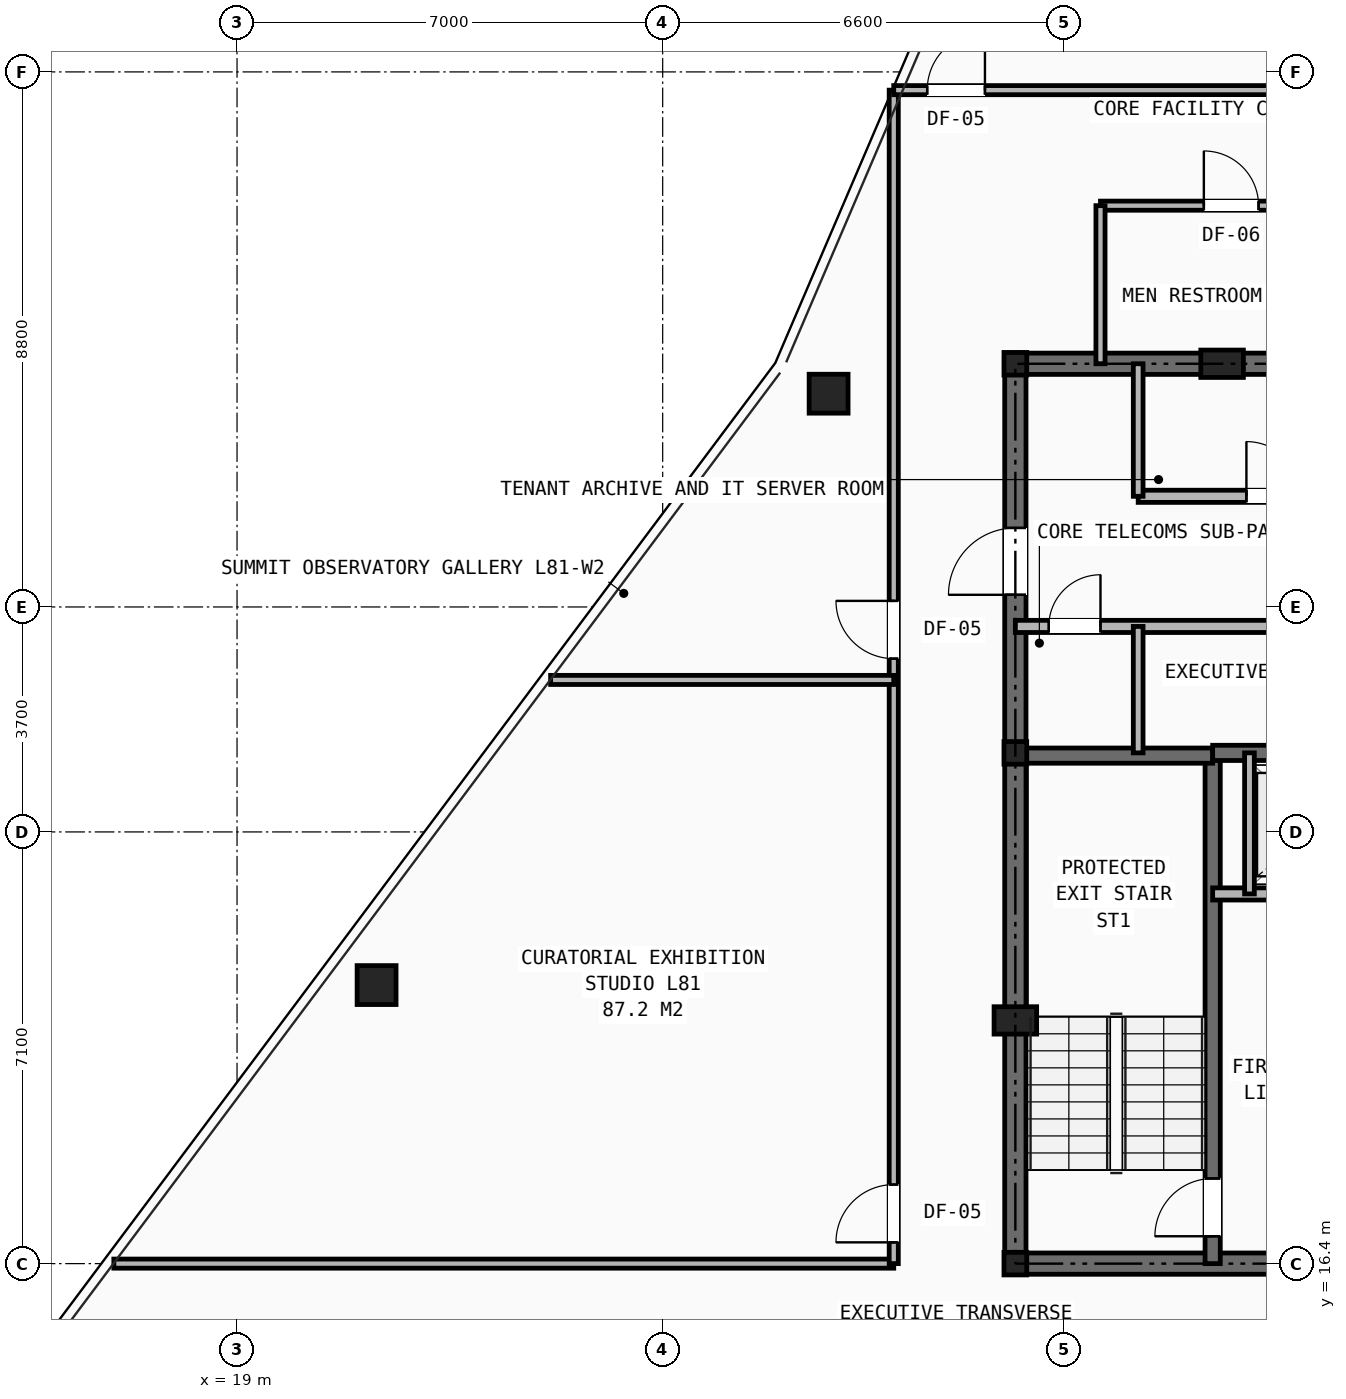
"""IFC4 building model, lengths in metres.
Left out: names, types, materials, properties, quantities, classifications, styles, units other than length and angle.
Written with IfcOpenShell. Run it as: python <this file> out.ifc"""

import sys

from ifc_helpers import new_model, si_unit, direction, frame, frame_2d, origin, origin_2d, place, context, subcontext, project, spatial, rectangle, hollow_rectangle, i_section, extrude, element, fill, save


model = new_model("IFC4")
c1 = context("Model", 3, precision=1e-05, world=origin(), true_north=direction((0.0, 1.0)))
c2 = subcontext(c1, "Body", "Model", "MODEL_VIEW")
j1 = project(units=[si_unit("LENGTHUNIT", "METRE"), si_unit("PLANEANGLEUNIT", "RADIAN")], contexts=[c1])
p1 = place(None, origin())
s1 = spatial("IfcSite", under=j1, at=p1, CompositionType="ELEMENT")
p2 = place(p1, origin())
s2 = spatial("IfcBuilding", under=s1, at=p2, CompositionType="ELEMENT")
p3 = place(p2, frame((0.0, 0.0, 286.5)))
s3 = spatial("IfcBuildingStorey", under=s2, at=p3, CompositionType="ELEMENT", Elevation=286.5)
for number, where, z_axis, x_axis in (
    (1, (31.8, 16.4, 0.0), (0.0, 0.0, 1.0), (1.0, 0.0, 0.0)),
    (2, (31.8, 24.8, 0.0), (0.0, 0.0, 1.0), (1.0, 0.0, 0.0)),
    (3, (31.8, 31.2, 0.0), (0.0, 0.0, 1.0), (1.0, 0.0, 0.0)),
):
    element("IfcColumn", number, at=place(p3, frame(where, z_axis=z_axis, x_axis=x_axis)), inside=s3, PredefinedType="COLUMN", context=c2, shape_type="SweptSolid", body=[
        extrude(i_section(OverallWidth=0.374, OverallDepth=0.372, WebThickness=0.016, FlangeThickness=0.026, at=origin_2d()), origin(), (0.0, 0.0, 1.0), 3.5),
    ])
for number, where, z_axis, x_axis in (
    (4, (31.8, 20.4, 0.0), (0.0, 0.0, 1.0), (1.0, 0.0, 0.0)),
    (5, (35.2, 31.2, 0.0), (0.0, 0.0, 1.0), (1.0, 0.0, 0.0)),
):
    element("IfcColumn", number, at=place(p3, frame(where, z_axis=z_axis, x_axis=x_axis)), inside=s3, PredefinedType="PILASTER", context=c2, shape_type="SweptSolid", body=[
        extrude(rectangle(XDim=0.7, YDim=0.45, at=origin_2d()), origin(), (0.0, 0.0, 1.0), 3.5),
    ])
for number, where, z_axis, x_axis in (
    (6, (28.729, 30.708, 0.0), (0.0, 0.0, 1.0), (1.0, 0.0, 0.0)),
    (7, (21.295, 20.981, 0.0), (0.0, 0.0, 1.0), (1.0, 0.0, 0.0)),
):
    element("IfcColumn", number, at=place(p3, frame(where, z_axis=z_axis, x_axis=x_axis)), inside=s3, PredefinedType="COLUMN", context=c2, shape_type="SweptSolid", body=[
        extrude(hollow_rectangle(XDim=0.64, YDim=0.64, WallThickness=0.045, at=origin_2d()), origin(), (0.0, 0.0, 1.0), 3.5),
    ])
p4 = place(p3, frame((31.8, 16.4, 0.0), z_axis=(0.0, 0.0, 1.0), x_axis=(1.0, 0.0, 0.0)))
e8 = element("IfcWall", 8, at=p4, inside=s3, PredefinedType="SHEAR", context=c2, shape_type="SweptSolid", body=[
    extrude(rectangle(XDim=16.4, YDim=0.35, at=frame_2d((8.2, 0.0))), origin(), (0.0, 0.0, 1.0), 3.2),
])
p5 = place(p4, frame((7.75, 0.0, 0.0)))
e9 = element("IfcOpeningElement", 9, at=p5, cuts=e8, PredefinedType="OPENING", context=c2, shape_type="SweptSolid", body=[
    extrude(rectangle(XDim=0.9, YDim=2.1, at=frame_2d((0.45, 1.05))), frame((0.0, 0.185, 0.0), z_axis=(0.0, -1.0, 0.0), x_axis=(1.0, 0.0, 0.0)), (0.0, 0.0, 1.0), 0.37),
])
p6 = place(p4, frame((4.2, 0.0, 0.0)))
e10 = element("IfcOpeningElement", 10, at=p6, cuts=e8, PredefinedType="OPENING", context=c2, shape_type="SweptSolid", body=[
    extrude(rectangle(XDim=0.95, YDim=2.1, at=frame_2d((0.475, 1.05))), frame((0.0, 0.185, 0.0), z_axis=(0.0, -1.0, 0.0), x_axis=(1.0, 0.0, 0.0)), (0.0, 0.0, 1.0), 0.37),
])
p7 = place(p4, frame((10.6, 0.0, 0.0)))
e11 = element("IfcOpeningElement", 11, at=p7, cuts=e8, PredefinedType="OPENING", context=c2, shape_type="SweptSolid", body=[
    extrude(rectangle(XDim=0.95, YDim=2.1, at=frame_2d((0.475, 1.05))), frame((0.0, 0.185, 0.0), z_axis=(0.0, -1.0, 0.0), x_axis=(1.0, 0.0, 0.0)), (0.0, 0.0, 1.0), 0.37),
])
p8 = place(p3, frame((31.8, 31.2, 0.0), z_axis=(0.0, 0.0, 1.0), x_axis=(1.0, 0.0, 0.0)))
e12 = element("IfcWall", 12, at=p8, inside=s3, PredefinedType="SHEAR", context=c2, shape_type="SweptSolid", body=[
    extrude(rectangle(XDim=16.4, YDim=0.35, at=frame_2d((8.2, 0.0))), origin(), (0.0, 0.0, 1.0), 3.2),
])
p9 = place(p3, frame((31.8, 16.4, 0.0), z_axis=(0.0, 0.0, 1.0), x_axis=(0.0, 1.0, 0.0)))
e13 = element("IfcWall", 13, at=p9, inside=s3, PredefinedType="SHEAR", context=c2, shape_type="SweptSolid", body=[
    extrude(rectangle(XDim=14.8, YDim=0.35, at=frame_2d((7.4, 0.0))), origin(), (0.0, 0.0, 1.0), 3.2),
])
p10 = place(p9, frame((11.0, 0.0, 0.0)))
e14 = element("IfcOpeningElement", 14, at=p10, cuts=e13, PredefinedType="OPENING", context=c2, shape_type="SweptSolid", body=[
    extrude(rectangle(XDim=1.1, YDim=2.15, at=frame_2d((0.55, 1.075))), frame((0.0, 0.185, 0.0), z_axis=(0.0, -1.0, 0.0), x_axis=(1.0, 0.0, 0.0)), (0.0, 0.0, 1.0), 0.37),
])
p11 = place(p3, frame((35.045, 16.4, 0.0), z_axis=(0.0, 0.0, 1.0), x_axis=(0.0, 1.0, 0.0)))
e15 = element("IfcWall", 15, at=p11, inside=s3, PredefinedType="SHEAR", context=c2, shape_type="SweptSolid", body=[
    extrude(rectangle(XDim=8.4, YDim=0.25, at=frame_2d((4.2, 0.0))), origin(), (0.0, 0.0, 1.0), 3.2),
])
p12 = place(p11, frame((0.45, 0.0, 0.0)))
e16 = element("IfcOpeningElement", 16, at=p12, cuts=e15, PredefinedType="OPENING", context=c2, shape_type="SweptSolid", body=[
    extrude(rectangle(XDim=0.95, YDim=2.1, at=frame_2d((0.475, 1.05))), frame((0.0, 0.135, 0.0), z_axis=(0.0, -1.0, 0.0), x_axis=(1.0, 0.0, 0.0)), (0.0, 0.0, 1.0), 0.27),
])
p13 = place(p3, frame((31.8, 24.755, 0.0), z_axis=(0.0, 0.0, 1.0), x_axis=(1.0, 0.0, 0.0)))
e17 = element("IfcWall", 17, at=p13, inside=s3, PredefinedType="SHEAR", context=c2, shape_type="SweptSolid", body=[
    extrude(rectangle(XDim=3.245, YDim=0.25, at=frame_2d((1.623, 0.0))), origin(), (0.0, 0.0, 1.0), 3.2),
])
p14 = place(p3, frame((35.045, 24.8, 0.0), z_axis=(0.0, 0.0, 1.0), x_axis=(1.0, 0.0, 0.0)))
e18 = element("IfcWall", 18, at=p14, inside=s3, PredefinedType="SHEAR", context=c2, shape_type="SweptSolid", body=[
    extrude(rectangle(XDim=9.91, YDim=0.25, at=frame_2d((4.955, 0.0))), origin(), (0.0, 0.0, 1.0), 3.2),
])
p15 = place(p3, frame((35.045, 22.48, 0.0), z_axis=(0.0, 0.0, 1.0), x_axis=(1.0, 0.0, 0.0)))
e19 = element("IfcWall", 19, at=p15, inside=s3, PredefinedType="SOLIDWALL", context=c2, shape_type="SweptSolid", body=[
    extrude(rectangle(XDim=9.91, YDim=0.2, at=frame_2d((4.955, 0.0))), origin(), (0.0, 0.0, 1.0), 3.2),
])
p16 = place(p15, frame((1.255, 0.0, 0.0)))
e20 = element("IfcOpeningElement", 20, at=p16, cuts=e19, PredefinedType="OPENING", context=c2, shape_type="SweptSolid", body=[
    extrude(rectangle(XDim=1.1, YDim=2.15, at=frame_2d((0.55, 1.075))), frame((0.0, 0.11, 0.0), z_axis=(0.0, -1.0, 0.0), x_axis=(1.0, 0.0, 0.0)), (0.0, 0.0, 1.0), 0.22),
])
p17 = place(p15, frame((7.555, 0.0, 0.0)))
e21 = element("IfcOpeningElement", 21, at=p17, cuts=e19, PredefinedType="OPENING", context=c2, shape_type="SweptSolid", body=[
    extrude(rectangle(XDim=1.1, YDim=2.15, at=frame_2d((0.55, 1.075))), frame((0.0, 0.11, 0.0), z_axis=(0.0, -1.0, 0.0), x_axis=(1.0, 0.0, 0.0)), (0.0, 0.0, 1.0), 0.22),
])
p18 = place(p15, frame((4.405, 0.0, 0.0)))
e22 = element("IfcOpeningElement", 22, at=p18, cuts=e19, PredefinedType="OPENING", context=c2, shape_type="SweptSolid", body=[
    extrude(rectangle(XDim=1.1, YDim=2.15, at=frame_2d((0.55, 1.075))), frame((0.0, 0.11, 0.0), z_axis=(0.0, -1.0, 0.0), x_axis=(1.0, 0.0, 0.0)), (0.0, 0.0, 1.0), 0.22),
])
p19 = place(p3, frame((35.65, 22.48, 0.0), z_axis=(0.0, 0.0, 1.0), x_axis=(0.0, 1.0, 0.0)))
e23 = element("IfcWall", 23, at=p19, inside=s3, PredefinedType="SOLIDWALL", context=c2, shape_type="SweptSolid", body=[
    extrude(rectangle(XDim=2.32, YDim=0.16, at=frame_2d((1.16, 0.0))), origin(), (0.0, 0.0, 1.0), 3.2),
])
p20 = place(p3, frame((33.82, 29.02, 0.0), z_axis=(0.0, 0.0, 1.0), x_axis=(1.0, 0.0, 0.0)))
e24 = element("IfcWall", 24, at=p20, inside=s3, PredefinedType="SOLIDWALL", context=c2, shape_type="SweptSolid", body=[
    extrude(rectangle(XDim=14.38, YDim=0.2, at=frame_2d((7.19, 0.0))), origin(), (0.0, 0.0, 1.0), 2.655),
])
p21 = place(p20, frame((1.78, 0.0, 0.0)))
e25 = element("IfcOpeningElement", 25, at=p21, cuts=e24, PredefinedType="OPENING", context=c2, shape_type="SweptSolid", body=[
    extrude(rectangle(XDim=0.9, YDim=2.1, at=frame_2d((0.45, 1.05))), frame((0.0, 0.11, 0.0), z_axis=(0.0, -1.0, 0.0), x_axis=(1.0, 0.0, 0.0)), (0.0, 0.0, 1.0), 0.22),
])
p22 = place(p20, frame((6.07, 0.0, 0.0)))
e26 = element("IfcOpeningElement", 26, at=p22, cuts=e24, PredefinedType="OPENING", context=c2, shape_type="SweptSolid", body=[
    extrude(rectangle(XDim=0.9, YDim=2.1, at=frame_2d((0.45, 1.05))), frame((0.0, 0.11, 0.0), z_axis=(0.0, -1.0, 0.0), x_axis=(1.0, 0.0, 0.0)), (0.0, 0.0, 1.0), 0.22),
])
p23 = place(p20, frame((9.39, 0.0, 0.0)))
e27 = element("IfcOpeningElement", 27, at=p23, cuts=e24, PredefinedType="OPENING", context=c2, shape_type="SweptSolid", body=[
    extrude(rectangle(XDim=1.1, YDim=2.15, at=frame_2d((0.55, 1.075))), frame((0.0, 0.11, 0.0), z_axis=(0.0, -1.0, 0.0), x_axis=(1.0, 0.0, 0.0)), (0.0, 0.0, 1.0), 0.22),
])
p24 = place(p20, frame((11.71, 0.0, 0.0)))
e28 = element("IfcOpeningElement", 28, at=p24, cuts=e24, PredefinedType="OPENING", context=c2, shape_type="SweptSolid", body=[
    extrude(rectangle(XDim=1.1, YDim=2.15, at=frame_2d((0.55, 1.075))), frame((0.0, 0.11, 0.0), z_axis=(0.0, -1.0, 0.0), x_axis=(1.0, 0.0, 0.0)), (0.0, 0.0, 1.0), 0.22),
])
p25 = place(p3, frame((31.8, 26.88, 0.0), z_axis=(0.0, 0.0, 1.0), x_axis=(1.0, 0.0, 0.0)))
e29 = element("IfcWall", 29, at=p25, inside=s3, PredefinedType="SOLIDWALL", context=c2, shape_type="SweptSolid", body=[
    extrude(rectangle(XDim=16.4, YDim=0.2, at=frame_2d((8.2, 0.0))), origin(), (0.0, 0.0, 1.0), 2.655),
])
p26 = place(p25, frame((0.55, 0.0, 0.0)))
e30 = element("IfcOpeningElement", 30, at=p26, cuts=e29, PredefinedType="OPENING", context=c2, shape_type="SweptSolid", body=[
    extrude(rectangle(XDim=0.85, YDim=2.05, at=frame_2d((0.425, 1.025))), frame((0.0, 0.11, 0.0), z_axis=(0.0, -1.0, 0.0), x_axis=(1.0, 0.0, 0.0)), (0.0, 0.0, 1.0), 0.22),
])
p27 = place(p25, frame((5.94, 0.0, 0.0)))
e31 = element("IfcOpeningElement", 31, at=p27, cuts=e29, PredefinedType="OPENING", context=c2, shape_type="SweptSolid", body=[
    extrude(rectangle(XDim=0.9, YDim=2.1, at=frame_2d((0.45, 1.05))), frame((0.0, 0.11, 0.0), z_axis=(0.0, -1.0, 0.0), x_axis=(1.0, 0.0, 0.0)), (0.0, 0.0, 1.0), 0.22),
])
p28 = place(p25, frame((11.41, 0.0, 0.0)))
e32 = element("IfcOpeningElement", 32, at=p28, cuts=e29, PredefinedType="OPENING", context=c2, shape_type="SweptSolid", body=[
    extrude(rectangle(XDim=1.1, YDim=2.15, at=frame_2d((0.55, 1.075))), frame((0.0, 0.11, 0.0), z_axis=(0.0, -1.0, 0.0), x_axis=(1.0, 0.0, 0.0)), (0.0, 0.0, 1.0), 0.22),
])
p29 = place(p25, frame((13.73, 0.0, 0.0)))
e33 = element("IfcOpeningElement", 33, at=p29, cuts=e29, PredefinedType="OPENING", context=c2, shape_type="SweptSolid", body=[
    extrude(rectangle(XDim=1.1, YDim=2.15, at=frame_2d((0.55, 1.075))), frame((0.0, 0.11, 0.0), z_axis=(0.0, -1.0, 0.0), x_axis=(1.0, 0.0, 0.0)), (0.0, 0.0, 1.0), 0.22),
])
p30 = place(p3, frame((33.82, 29.02, 0.0), z_axis=(0.0, 0.0, 1.0), x_axis=(0.0, 1.0, 0.0)))
e34 = element("IfcWall", 34, at=p30, inside=s3, PredefinedType="SOLIDWALL", context=c2, shape_type="SweptSolid", body=[
    extrude(rectangle(XDim=2.18, YDim=0.16, at=frame_2d((1.09, 0.0))), origin(), (0.0, 0.0, 1.0), 2.655),
])
p31 = place(p3, frame((33.82, 24.8, 0.0), z_axis=(0.0, 0.0, 1.0), x_axis=(0.0, 1.0, 0.0)))
e35 = element("IfcWall", 35, at=p31, inside=s3, PredefinedType="SOLIDWALL", context=c2, shape_type="SweptSolid", body=[
    extrude(rectangle(XDim=2.08, YDim=0.16, at=frame_2d((1.04, 0.0))), origin(), (0.0, 0.0, 1.0), 3.2),
])
p32 = place(p3, frame((33.2, 33.8, 0.0), z_axis=(0.0, 0.0, 1.0), x_axis=(1.0, 0.0, 0.0)))
e36 = element("IfcWall", 36, at=p32, inside=s3, PredefinedType="PARTITIONING", context=c2, shape_type="SweptSolid", body=[
    extrude(rectangle(XDim=13.0, YDim=0.15, at=frame_2d((6.5, 0.0))), origin(), (0.0, 0.0, 1.0), 3.2),
])
p33 = place(p32, frame((1.7, 0.0, 0.0)))
e37 = element("IfcOpeningElement", 37, at=p33, cuts=e36, PredefinedType="OPENING", context=c2, shape_type="SweptSolid", body=[
    extrude(rectangle(XDim=0.9, YDim=2.1, at=frame_2d((0.45, 1.05))), frame((0.0, 0.085, 0.0), z_axis=(0.0, -1.0, 0.0), x_axis=(1.0, 0.0, 0.0)), (0.0, 0.0, 1.0), 0.17),
])
p34 = place(p32, frame((6.0, 0.0, 0.0)))
e38 = element("IfcOpeningElement", 38, at=p34, cuts=e36, PredefinedType="OPENING", context=c2, shape_type="SweptSolid", body=[
    extrude(rectangle(XDim=0.9, YDim=2.1, at=frame_2d((0.45, 1.05))), frame((0.0, 0.085, 0.0), z_axis=(0.0, -1.0, 0.0), x_axis=(1.0, 0.0, 0.0)), (0.0, 0.0, 1.0), 0.17),
])
p35 = place(p32, frame((10.35, 0.0, 0.0)))
e39 = element("IfcOpeningElement", 39, at=p35, cuts=e36, PredefinedType="OPENING", context=c2, shape_type="SweptSolid", body=[
    extrude(rectangle(XDim=0.9, YDim=2.1, at=frame_2d((0.45, 1.05))), frame((0.0, 0.085, 0.0), z_axis=(0.0, -1.0, 0.0), x_axis=(1.0, 0.0, 0.0)), (0.0, 0.0, 1.0), 0.17),
])
p36 = place(p3, frame((33.2, 31.2, 0.0), z_axis=(0.0, 0.0, 1.0), x_axis=(0.0, 1.0, 0.0)))
e40 = element("IfcWall", 40, at=p36, inside=s3, PredefinedType="PARTITIONING", context=c2, shape_type="SweptSolid", body=[
    extrude(rectangle(XDim=2.6, YDim=0.15, at=frame_2d((1.3, 0.0))), origin(), (0.0, 0.0, 1.0), 2.655),
])
p37 = place(p3, frame((16.974, 16.4, 0.0), z_axis=(0.0, 0.0, 1.0), x_axis=(1.0, 0.0, 0.0)))
e41 = element("IfcWall", 41, at=p37, inside=s3, PredefinedType="PARTITIONING", context=c2, shape_type="SweptSolid", body=[
    extrude(rectangle(XDim=12.826, YDim=0.15, at=frame_2d((6.413, 0.0))), origin(), (0.0, 0.0, 1.0), 2.242),
])
p38 = place(p3, frame((29.8, 16.4, 0.0), z_axis=(0.0, 0.0, 1.0), x_axis=(0.0, 1.0, 0.0)))
e42 = element("IfcWall", 42, at=p38, inside=s3, PredefinedType="PARTITIONING", context=c2, shape_type="SweptSolid", body=[
    extrude(rectangle(XDim=19.3, YDim=0.15, at=frame_2d((9.65, 0.0))), origin(), (0.0, 0.0, 1.0), 2.242),
])
p39 = place(p38, frame((0.35, 0.0, 0.0)))
e43 = element("IfcOpeningElement", 43, at=p39, cuts=e42, PredefinedType="OPENING", context=c2, shape_type="SweptSolid", body=[
    extrude(rectangle(XDim=0.95, YDim=2.1, at=frame_2d((0.475, 1.05))), frame((0.0, 0.085, 0.0), z_axis=(0.0, -1.0, 0.0), x_axis=(1.0, 0.0, 0.0)), (0.0, 0.0, 1.0), 0.17),
])
p40 = place(p38, frame((9.95, 0.0, 0.0)))
e44 = element("IfcOpeningElement", 44, at=p40, cuts=e42, PredefinedType="OPENING", context=c2, shape_type="SweptSolid", body=[
    extrude(rectangle(XDim=0.95, YDim=2.1, at=frame_2d((0.475, 1.05))), frame((0.0, 0.085, 0.0), z_axis=(0.0, -1.0, 0.0), x_axis=(1.0, 0.0, 0.0)), (0.0, 0.0, 1.0), 0.17),
])
p41 = place(p3, frame((29.8, 35.7, 0.0), z_axis=(0.0, 0.0, 1.0), x_axis=(1.0, 0.0, 0.0)))
e45 = element("IfcWall", 45, at=p41, inside=s3, PredefinedType="PARTITIONING", context=c2, shape_type="SweptSolid", body=[
    extrude(rectangle(XDim=9.475, YDim=0.15, at=frame_2d((4.737, 0.0))), origin(), (0.0, 0.0, 1.0), 2.578),
])
p42 = place(p41, frame((0.55, 0.0, 0.0)))
e46 = element("IfcOpeningElement", 46, at=p42, cuts=e45, PredefinedType="OPENING", context=c2, shape_type="SweptSolid", body=[
    extrude(rectangle(XDim=0.95, YDim=2.1, at=frame_2d((0.475, 1.05))), frame((0.0, 0.085, 0.0), z_axis=(0.0, -1.0, 0.0), x_axis=(1.0, 0.0, 0.0)), (0.0, 0.0, 1.0), 0.17),
])
p43 = place(p3, frame((24.157, 26.0, 0.0), z_axis=(0.0, 0.0, 1.0), x_axis=(1.0, 0.0, 0.0)))
e47 = element("IfcWall", 47, at=p43, inside=s3, PredefinedType="PARTITIONING", context=c2, shape_type="SweptSolid", body=[
    extrude(rectangle(XDim=5.643, YDim=0.15, at=frame_2d((2.821, 0.0))), origin(), (0.0, 0.0, 1.0), 2.578),
])
p44 = place(p12, origin())
e48 = element("IfcDoor", 48, at=p44, inside=s3, OperationType="SINGLE_SWING_LEFT", PredefinedType="DOOR", context=c2, shape_type="SweptSolid", body=[
    extrude(rectangle(XDim=0.95, YDim=2.1, at=frame_2d((0.475, 1.05))), frame((0.0, 0.025, 0.0), z_axis=(0.0, -1.0, 0.0), x_axis=(1.0, 0.0, 0.0)), (0.0, 0.0, 1.0), 0.05),
])
fill(e16, e48)
p45 = place(p26, origin())
e49 = element("IfcDoor", 49, at=p45, inside=s3, OperationType="SINGLE_SWING_RIGHT", PredefinedType="DOOR", context=c2, shape_type="SweptSolid", body=[
    extrude(rectangle(XDim=0.85, YDim=2.05, at=frame_2d((0.425, 1.025))), frame((0.0, 0.025, 0.0), z_axis=(0.0, -1.0, 0.0), x_axis=(1.0, 0.0, 0.0)), (0.0, 0.0, 1.0), 0.05),
])
fill(e30, e49)
p46 = place(p10, origin())
e50 = element("IfcDoor", 50, at=p46, inside=s3, OperationType="SINGLE_SWING_LEFT", PredefinedType="DOOR", context=c2, shape_type="SweptSolid", body=[
    extrude(rectangle(XDim=1.1, YDim=2.15, at=frame_2d((0.55, 1.075))), frame((0.0, 0.025, 0.0), z_axis=(0.0, -1.0, 0.0), x_axis=(1.0, 0.0, 0.0)), (0.0, 0.0, 1.0), 0.05),
])
fill(e14, e50)
p47 = place(p21, origin())
e51 = element("IfcDoor", 51, at=p47, inside=s3, OperationType="SINGLE_SWING_LEFT", PredefinedType="DOOR", context=c2, shape_type="SweptSolid", body=[
    extrude(rectangle(XDim=0.9, YDim=2.1, at=frame_2d((0.45, 1.05))), frame((0.0, 0.025, 0.0), z_axis=(0.0, -1.0, 0.0), x_axis=(1.0, 0.0, 0.0)), (0.0, 0.0, 1.0), 0.05),
])
fill(e25, e51)
p48 = place(p33, origin())
e52 = element("IfcDoor", 52, at=p48, inside=s3, OperationType="SINGLE_SWING_LEFT", PredefinedType="DOOR", context=c2, shape_type="SweptSolid", body=[
    extrude(rectangle(XDim=0.9, YDim=2.1, at=frame_2d((0.45, 1.05))), frame((0.0, 0.025, 0.0), z_axis=(0.0, -1.0, 0.0), x_axis=(1.0, 0.0, 0.0)), (0.0, 0.0, 1.0), 0.05),
])
fill(e37, e52)
p49 = place(p39, origin())
e53 = element("IfcDoor", 53, at=p49, inside=s3, OperationType="SINGLE_SWING_LEFT", PredefinedType="DOOR", context=c2, shape_type="SweptSolid", body=[
    extrude(rectangle(XDim=0.95, YDim=2.1, at=frame_2d((0.475, 1.05))), frame((0.0, 0.025, 0.0), z_axis=(0.0, -1.0, 0.0), x_axis=(1.0, 0.0, 0.0)), (0.0, 0.0, 1.0), 0.05),
])
fill(e43, e53)
p50 = place(p40, origin())
e54 = element("IfcDoor", 54, at=p50, inside=s3, OperationType="SINGLE_SWING_RIGHT", PredefinedType="DOOR", context=c2, shape_type="SweptSolid", body=[
    extrude(rectangle(XDim=0.95, YDim=2.1, at=frame_2d((0.475, 1.05))), frame((0.0, 0.025, 0.0), z_axis=(0.0, -1.0, 0.0), x_axis=(1.0, 0.0, 0.0)), (0.0, 0.0, 1.0), 0.05),
])
fill(e44, e54)
p51 = place(p42, origin())
e55 = element("IfcDoor", 55, at=p51, inside=s3, OperationType="SINGLE_SWING_RIGHT", PredefinedType="DOOR", context=c2, shape_type="SweptSolid", body=[
    extrude(rectangle(XDim=0.95, YDim=2.1, at=frame_2d((0.475, 1.05))), frame((0.0, 0.025, 0.0), z_axis=(0.0, -1.0, 0.0), x_axis=(1.0, 0.0, 0.0)), (0.0, 0.0, 1.0), 0.05),
])
fill(e46, e55)
save(model, sys.argv[1])
